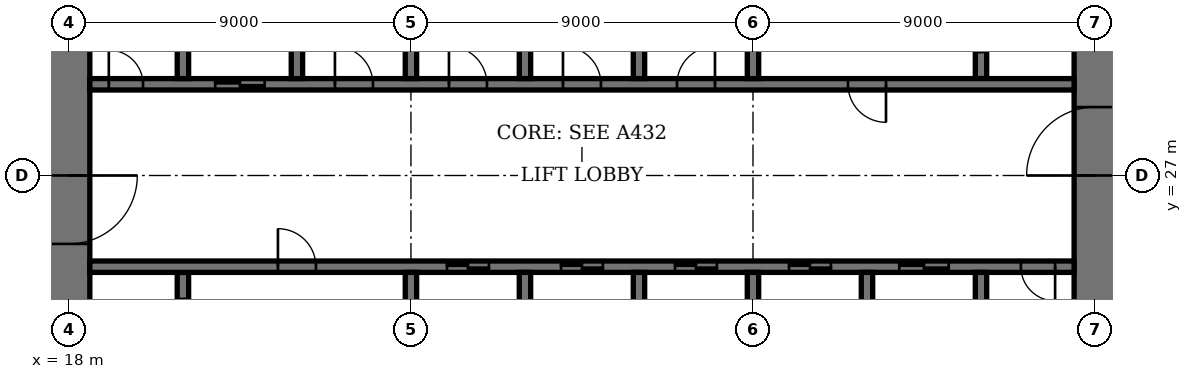
"""IFC4 building model, lengths in metres.
Left out: names, types, materials, properties, quantities, classifications, styles, units other than length and angle.
Written with IfcOpenShell. Run it as: python <this file> out.ifc"""

import sys

from ifc_helpers import new_model, si_unit, direction, frame, frame_2d, origin, place, context, subcontext, project, spatial, rectangle, extrude, element, fill, save


model = new_model("IFC4")
c1 = context("Model", 3, precision=1e-05, world=origin(), true_north=direction((0.0, 1.0)))
c2 = subcontext(c1, "Body", "Model", "MODEL_VIEW")
j1 = project(units=[si_unit("LENGTHUNIT", "METRE"), si_unit("PLANEANGLEUNIT", "RADIAN")], contexts=[c1])
p1 = place(None, origin())
s1 = spatial("IfcSite", under=j1, at=p1, CompositionType="ELEMENT")
p2 = place(p1, origin())
s2 = spatial("IfcBuilding", under=s1, at=p2, CompositionType="ELEMENT")
p3 = place(p2, frame((0.0, 0.0, 307.4)))
s3 = spatial("IfcBuildingStorey", under=s2, at=p3, CompositionType="ELEMENT", Elevation=307.4)
p4 = place(p3, frame((18.0, 35.45, 0.0), z_axis=(0.0, 0.0, 1.0), x_axis=(0.0, -1.0, 0.0)))
e1 = element("IfcWall", 1, at=p4, inside=s3, PredefinedType="SHEAR", context=c2, shape_type="SweptSolid", body=[
    extrude(rectangle(XDim=16.9, YDim=1.1, at=frame_2d((8.45, 0.0))), origin(), (0.0, 0.0, 1.0), 4.4),
])
p5 = place(p4, frame((8.45, 0.0, 0.0)))
e2 = element("IfcOpeningElement", 2, at=p5, cuts=e1, PredefinedType="OPENING", context=c2, shape_type="SweptSolid", body=[
    extrude(rectangle(XDim=1.8, YDim=2.4, at=frame_2d((0.9, 1.2))), frame((0.0, 0.56, 0.0), z_axis=(0.0, -1.0, 0.0), x_axis=(1.0, 0.0, 0.0)), (0.0, 0.0, 1.0), 1.12),
])
p6 = place(p3, frame((45.0, 18.55, 0.0), z_axis=(0.0, 0.0, 1.0), x_axis=(0.0, 1.0, 0.0)))
e3 = element("IfcWall", 3, at=p6, inside=s3, PredefinedType="SHEAR", context=c2, shape_type="SweptSolid", body=[
    extrude(rectangle(XDim=16.9, YDim=1.1, at=frame_2d((8.45, 0.0))), origin(), (0.0, 0.0, 1.0), 4.4),
])
p7 = place(p6, frame((8.45, 0.0, 0.0)))
e4 = element("IfcOpeningElement", 4, at=p7, cuts=e3, PredefinedType="OPENING", context=c2, shape_type="SweptSolid", body=[
    extrude(rectangle(XDim=1.8, YDim=2.4, at=frame_2d((0.9, 1.2))), frame((0.0, 0.56, 0.0), z_axis=(0.0, -1.0, 0.0), x_axis=(1.0, 0.0, 0.0)), (0.0, 0.0, 1.0), 1.12),
])
p8 = place(p3, frame((21.0, 21.95, 0.0), z_axis=(0.0, 0.0, 1.0), x_axis=(0.0, 1.0, 0.0)))
e5 = element("IfcWall", 5, at=p8, inside=s3, PredefinedType="SHEAR", context=c2, shape_type="SweptSolid", body=[
    extrude(rectangle(XDim=2.5, YDim=0.3, at=frame_2d((1.25, 0.0))), origin(), (0.0, 0.0, 1.0), 4.4),
])
p9 = place(p8, frame((0.7, 0.0, 0.0)))
e6 = element("IfcOpeningElement", 6, at=p9, cuts=e5, PredefinedType="OPENING", context=c2, shape_type="SweptSolid", body=[
    extrude(rectangle(XDim=1.1, YDim=2.4, at=frame_2d((0.55, 1.2))), frame((0.0, 0.16, 0.0), z_axis=(0.0, -1.0, 0.0), x_axis=(1.0, 0.0, 0.0)), (0.0, 0.0, 1.0), 0.32),
])
p10 = place(p3, frame((42.0, 29.55, 0.0), z_axis=(0.0, 0.0, 1.0), x_axis=(0.0, 1.0, 0.0)))
e7 = element("IfcWall", 7, at=p10, inside=s3, PredefinedType="SHEAR", context=c2, shape_type="SweptSolid", body=[
    extrude(rectangle(XDim=2.5, YDim=0.3, at=frame_2d((1.25, 0.0))), origin(), (0.0, 0.0, 1.0), 4.4),
])
p11 = place(p10, frame((0.7, 0.0, 0.0)))
e8 = element("IfcOpeningElement", 8, at=p11, cuts=e7, PredefinedType="OPENING", context=c2, shape_type="SweptSolid", body=[
    extrude(rectangle(XDim=1.1, YDim=2.4, at=frame_2d((0.55, 1.2))), frame((0.0, 0.16, 0.0), z_axis=(0.0, -1.0, 0.0), x_axis=(1.0, 0.0, 0.0)), (0.0, 0.0, 1.0), 0.32),
])
p12 = place(p3, frame((18.55, 24.6, 0.0), z_axis=(0.0, 0.0, 1.0), x_axis=(1.0, 0.0, 0.0)))
e9 = element("IfcWall", 9, at=p12, inside=s3, PredefinedType="SHEAR", context=c2, shape_type="SweptSolid", body=[
    extrude(rectangle(XDim=25.9, YDim=0.3, at=frame_2d((12.95, 0.0))), origin(), (0.0, 0.0, 1.0), 4.4),
])
p13 = place(p12, frame((4.95, 0.0, 0.0)))
e10 = element("IfcOpeningElement", 10, at=p13, cuts=e9, PredefinedType="OPENING", context=c2, shape_type="SweptSolid", body=[
    extrude(rectangle(XDim=1.0, YDim=2.4, at=frame_2d((0.5, 1.2))), frame((0.0, 0.16, 0.0), z_axis=(0.0, -1.0, 0.0), x_axis=(1.0, 0.0, 0.0)), (0.0, 0.0, 1.0), 0.32),
])
p14 = place(p12, frame((24.5, 0.0, 0.0)))
e11 = element("IfcOpeningElement", 11, at=p14, cuts=e9, PredefinedType="OPENING", context=c2, shape_type="SweptSolid", body=[
    extrude(rectangle(XDim=0.9, YDim=2.1, at=frame_2d((0.45, 1.05))), frame((0.0, 0.16, 0.0), z_axis=(0.0, -1.0, 0.0), x_axis=(1.0, 0.0, 0.0)), (0.0, 0.0, 1.0), 0.32),
])
p15 = place(p12, frame((9.4, 0.0, 0.0)))
e12 = element("IfcOpeningElement", 12, at=p15, cuts=e9, PredefinedType="OPENING", context=c2, shape_type="SweptSolid", body=[
    extrude(rectangle(XDim=1.1, YDim=2.4, at=frame_2d((0.55, 1.2))), frame((0.0, 0.16, 0.0), z_axis=(0.0, -1.0, 0.0), x_axis=(1.0, 0.0, 0.0)), (0.0, 0.0, 1.0), 0.32),
])
p16 = place(p12, frame((12.4, 0.0, 0.0)))
e13 = element("IfcOpeningElement", 13, at=p16, cuts=e9, PredefinedType="OPENING", context=c2, shape_type="SweptSolid", body=[
    extrude(rectangle(XDim=1.1, YDim=2.4, at=frame_2d((0.55, 1.2))), frame((0.0, 0.16, 0.0), z_axis=(0.0, -1.0, 0.0), x_axis=(1.0, 0.0, 0.0)), (0.0, 0.0, 1.0), 0.32),
])
p17 = place(p12, frame((15.4, 0.0, 0.0)))
e14 = element("IfcOpeningElement", 14, at=p17, cuts=e9, PredefinedType="OPENING", context=c2, shape_type="SweptSolid", body=[
    extrude(rectangle(XDim=1.1, YDim=2.4, at=frame_2d((0.55, 1.2))), frame((0.0, 0.16, 0.0), z_axis=(0.0, -1.0, 0.0), x_axis=(1.0, 0.0, 0.0)), (0.0, 0.0, 1.0), 0.32),
])
p18 = place(p12, frame((18.4, 0.0, 0.0)))
e15 = element("IfcOpeningElement", 15, at=p18, cuts=e9, PredefinedType="OPENING", context=c2, shape_type="SweptSolid", body=[
    extrude(rectangle(XDim=1.1, YDim=2.4, at=frame_2d((0.55, 1.2))), frame((0.0, 0.16, 0.0), z_axis=(0.0, -1.0, 0.0), x_axis=(1.0, 0.0, 0.0)), (0.0, 0.0, 1.0), 0.32),
])
p19 = place(p12, frame((21.3, 0.0, 0.0)))
e16 = element("IfcOpeningElement", 16, at=p19, cuts=e9, PredefinedType="OPENING", context=c2, shape_type="SweptSolid", body=[
    extrude(rectangle(XDim=1.3, YDim=2.4, at=frame_2d((0.65, 1.2))), frame((0.0, 0.16, 0.0), z_axis=(0.0, -1.0, 0.0), x_axis=(1.0, 0.0, 0.0)), (0.0, 0.0, 1.0), 0.32),
])
p20 = place(p3, frame((18.55, 29.4, 0.0), z_axis=(0.0, 0.0, 1.0), x_axis=(1.0, 0.0, 0.0)))
e17 = element("IfcWall", 17, at=p20, inside=s3, PredefinedType="SHEAR", context=c2, shape_type="SweptSolid", body=[
    extrude(rectangle(XDim=25.9, YDim=0.3, at=frame_2d((12.95, 0.0))), origin(), (0.0, 0.0, 1.0), 4.4),
])
p21 = place(p20, frame((19.95, 0.0, 0.0)))
e18 = element("IfcOpeningElement", 18, at=p21, cuts=e17, PredefinedType="OPENING", context=c2, shape_type="SweptSolid", body=[
    extrude(rectangle(XDim=1.0, YDim=2.4, at=frame_2d((0.5, 1.2))), frame((0.0, 0.16, 0.0), z_axis=(0.0, -1.0, 0.0), x_axis=(1.0, 0.0, 0.0)), (0.0, 0.0, 1.0), 0.32),
])
p22 = place(p20, frame((0.5, 0.0, 0.0)))
e19 = element("IfcOpeningElement", 19, at=p22, cuts=e17, PredefinedType="OPENING", context=c2, shape_type="SweptSolid", body=[
    extrude(rectangle(XDim=0.9, YDim=2.1, at=frame_2d((0.45, 1.05))), frame((0.0, 0.16, 0.0), z_axis=(0.0, -1.0, 0.0), x_axis=(1.0, 0.0, 0.0)), (0.0, 0.0, 1.0), 0.32),
])
p23 = place(p20, frame((15.45, 0.0, 0.0)))
e20 = element("IfcOpeningElement", 20, at=p23, cuts=e17, PredefinedType="OPENING", context=c2, shape_type="SweptSolid", body=[
    extrude(rectangle(XDim=1.0, YDim=2.4, at=frame_2d((0.5, 1.2))), frame((0.0, 0.16, 0.0), z_axis=(0.0, -1.0, 0.0), x_axis=(1.0, 0.0, 0.0)), (0.0, 0.0, 1.0), 0.32),
])
p24 = place(p20, frame((12.45, 0.0, 0.0)))
e21 = element("IfcOpeningElement", 21, at=p24, cuts=e17, PredefinedType="OPENING", context=c2, shape_type="SweptSolid", body=[
    extrude(rectangle(XDim=1.0, YDim=2.4, at=frame_2d((0.5, 1.2))), frame((0.0, 0.16, 0.0), z_axis=(0.0, -1.0, 0.0), x_axis=(1.0, 0.0, 0.0)), (0.0, 0.0, 1.0), 0.32),
])
p25 = place(p20, frame((9.45, 0.0, 0.0)))
e22 = element("IfcOpeningElement", 22, at=p25, cuts=e17, PredefinedType="OPENING", context=c2, shape_type="SweptSolid", body=[
    extrude(rectangle(XDim=1.0, YDim=2.4, at=frame_2d((0.5, 1.2))), frame((0.0, 0.16, 0.0), z_axis=(0.0, -1.0, 0.0), x_axis=(1.0, 0.0, 0.0)), (0.0, 0.0, 1.0), 0.32),
])
p26 = place(p20, frame((6.45, 0.0, 0.0)))
e23 = element("IfcOpeningElement", 23, at=p26, cuts=e17, PredefinedType="OPENING", context=c2, shape_type="SweptSolid", body=[
    extrude(rectangle(XDim=1.0, YDim=2.4, at=frame_2d((0.5, 1.2))), frame((0.0, 0.16, 0.0), z_axis=(0.0, -1.0, 0.0), x_axis=(1.0, 0.0, 0.0)), (0.0, 0.0, 1.0), 0.32),
])
p27 = place(p20, frame((3.3, 0.0, 0.0)))
e24 = element("IfcOpeningElement", 24, at=p27, cuts=e17, PredefinedType="OPENING", context=c2, shape_type="SweptSolid", body=[
    extrude(rectangle(XDim=1.3, YDim=2.4, at=frame_2d((0.65, 1.2))), frame((0.0, 0.16, 0.0), z_axis=(0.0, -1.0, 0.0), x_axis=(1.0, 0.0, 0.0)), (0.0, 0.0, 1.0), 0.32),
])
for number, where, z_axis, x_axis in (
    (25, (30.0, 21.75, 0.0), (0.0, 0.0, 1.0), (0.0, 1.0, 0.0)),
    (26, (33.0, 29.55, 0.0), (0.0, 0.0, 1.0), (0.0, 1.0, 0.0)),
    (27, (33.0, 21.75, 0.0), (0.0, 0.0, 1.0), (0.0, 1.0, 0.0)),
    (28, (30.0, 29.55, 0.0), (0.0, 0.0, 1.0), (0.0, 1.0, 0.0)),
    (29, (36.0, 21.75, 0.0), (0.0, 0.0, 1.0), (0.0, 1.0, 0.0)),
    (30, (27.0, 29.55, 0.0), (0.0, 0.0, 1.0), (0.0, 1.0, 0.0)),
):
    element("IfcWall", number, at=place(p3, frame(where, z_axis=z_axis, x_axis=x_axis)), inside=s3, PredefinedType="SHEAR", context=c2, shape_type="SweptSolid", body=[
        extrude(rectangle(XDim=2.7, YDim=0.3, at=frame_2d((1.35, 0.0))), origin(), (0.0, 0.0, 1.0), 4.4),
    ])
for number, where, z_axis, x_axis in (
    (31, (39.0, 18.55, 0.0), (0.0, 0.0, 1.0), (0.0, 1.0, 0.0)),
    (32, (24.0, 29.55, 0.0), (0.0, 0.0, 1.0), (0.0, 1.0, 0.0)),
):
    element("IfcWall", number, at=place(p3, frame(where, z_axis=z_axis, x_axis=x_axis)), inside=s3, PredefinedType="SHEAR", context=c2, shape_type="SweptSolid", body=[
        extrude(rectangle(XDim=5.9, YDim=0.3, at=frame_2d((2.95, 0.0))), origin(), (0.0, 0.0, 1.0), 4.4),
    ])
for number, where, z_axis, x_axis in (
    (33, (42.0, 21.75, 0.0), (0.0, 0.0, 1.0), (0.0, 1.0, 0.0)),
    (34, (21.0, 29.55, 0.0), (0.0, 0.0, 1.0), (0.0, 1.0, 0.0)),
):
    element("IfcWall", number, at=place(p3, frame(where, z_axis=z_axis, x_axis=x_axis)), inside=s3, PredefinedType="SHEAR", context=c2, shape_type="SweptSolid", body=[
        extrude(rectangle(XDim=2.7, YDim=0.3, at=frame_2d((1.35, 0.0))), origin(), (0.0, 0.0, 1.0), 4.4),
    ])
for number, where, z_axis, x_axis in (
    (35, (27.0, 21.6, 0.0), (0.0, 0.0, 1.0), (0.0, 1.0, 0.0)),
    (36, (36.0, 29.55, 0.0), (0.0, 0.0, 1.0), (0.0, 1.0, 0.0)),
):
    element("IfcWall", number, at=place(p3, frame(where, z_axis=z_axis, x_axis=x_axis)), inside=s3, PredefinedType="SHEAR", context=c2, shape_type="SweptSolid", body=[
        extrude(rectangle(XDim=2.85, YDim=0.3, at=frame_2d((1.425, 0.0))), origin(), (0.0, 0.0, 1.0), 4.4),
    ])
p28 = place(p5, origin())
e37 = element("IfcDoor", 37, at=p28, inside=s3, OperationType="DOUBLE_DOOR_DOUBLE_SWING", PredefinedType="DOOR", context=c2, shape_type="SweptSolid", body=[
    extrude(rectangle(XDim=1.8, YDim=2.4, at=frame_2d((0.9, 1.2))), frame((0.0, 0.03, 0.0), z_axis=(0.0, -1.0, 0.0), x_axis=(1.0, 0.0, 0.0)), (0.0, 0.0, 1.0), 0.06),
    extrude(rectangle(XDim=0.04, YDim=2.4, at=frame_2d((0.02, 1.2))), frame((0.0, 0.55, 0.0), z_axis=(0.0, -1.0, 0.0), x_axis=(1.0, 0.0, 0.0)), (0.0, 0.0, 1.0), 1.1),
    extrude(rectangle(XDim=0.04, YDim=2.4, at=frame_2d((1.78, 1.2))), frame((0.0, 0.55, 0.0), z_axis=(0.0, -1.0, 0.0), x_axis=(1.0, 0.0, 0.0)), (0.0, 0.0, 1.0), 1.1),
    extrude(rectangle(XDim=1.8, YDim=0.04, at=frame_2d((0.9, 2.38))), frame((0.0, 0.55, 0.0), z_axis=(0.0, -1.0, 0.0), x_axis=(1.0, 0.0, 0.0)), (0.0, 0.0, 1.0), 1.1),
])
fill(e2, e37)
p29 = place(p7, origin())
e38 = element("IfcDoor", 38, at=p29, inside=s3, OperationType="DOUBLE_DOOR_DOUBLE_SWING", PredefinedType="DOOR", context=c2, shape_type="SweptSolid", body=[
    extrude(rectangle(XDim=1.8, YDim=2.4, at=frame_2d((0.9, 1.2))), frame((0.0, 0.03, 0.0), z_axis=(0.0, -1.0, 0.0), x_axis=(1.0, 0.0, 0.0)), (0.0, 0.0, 1.0), 0.06),
    extrude(rectangle(XDim=0.04, YDim=2.4, at=frame_2d((0.02, 1.2))), frame((0.0, 0.55, 0.0), z_axis=(0.0, -1.0, 0.0), x_axis=(1.0, 0.0, 0.0)), (0.0, 0.0, 1.0), 1.1),
    extrude(rectangle(XDim=0.04, YDim=2.4, at=frame_2d((1.78, 1.2))), frame((0.0, 0.55, 0.0), z_axis=(0.0, -1.0, 0.0), x_axis=(1.0, 0.0, 0.0)), (0.0, 0.0, 1.0), 1.1),
    extrude(rectangle(XDim=1.8, YDim=0.04, at=frame_2d((0.9, 2.38))), frame((0.0, 0.55, 0.0), z_axis=(0.0, -1.0, 0.0), x_axis=(1.0, 0.0, 0.0)), (0.0, 0.0, 1.0), 1.1),
])
fill(e4, e38)
p30 = place(p13, origin())
e39 = element("IfcDoor", 39, at=p30, inside=s3, OperationType="SINGLE_SWING_RIGHT", PredefinedType="DOOR", context=c2, shape_type="SweptSolid", body=[
    extrude(rectangle(XDim=1.0, YDim=2.4, at=frame_2d((0.5, 1.2))), frame((0.0, 0.03, 0.0), z_axis=(0.0, -1.0, 0.0), x_axis=(1.0, 0.0, 0.0)), (0.0, 0.0, 1.0), 0.06),
])
fill(e10, e39)
p31 = place(p21, origin())
e40 = element("IfcDoor", 40, at=p31, inside=s3, OperationType="SINGLE_SWING_RIGHT", PredefinedType="DOOR", context=c2, shape_type="SweptSolid", body=[
    extrude(rectangle(XDim=1.0, YDim=2.4, at=frame_2d((0.5, 1.2))), frame((0.0, 0.03, 0.0), z_axis=(0.0, -1.0, 0.0), x_axis=(1.0, 0.0, 0.0)), (0.0, 0.0, 1.0), 0.06),
])
fill(e18, e40)
p32 = place(p14, origin())
e41 = element("IfcDoor", 41, at=p32, inside=s3, OperationType="SINGLE_SWING_RIGHT", PredefinedType="DOOR", context=c2, shape_type="SweptSolid", body=[
    extrude(rectangle(XDim=0.9, YDim=2.1, at=frame_2d((0.45, 1.05))), frame((0.0, 0.03, 0.0), z_axis=(0.0, -1.0, 0.0), x_axis=(1.0, 0.0, 0.0)), (0.0, 0.0, 1.0), 0.06),
])
fill(e11, e41)
p33 = place(p22, origin())
e42 = element("IfcDoor", 42, at=p33, inside=s3, OperationType="SINGLE_SWING_RIGHT", PredefinedType="DOOR", context=c2, shape_type="SweptSolid", body=[
    extrude(rectangle(XDim=0.9, YDim=2.1, at=frame_2d((0.45, 1.05))), frame((0.0, 0.03, 0.0), z_axis=(0.0, -1.0, 0.0), x_axis=(1.0, 0.0, 0.0)), (0.0, 0.0, 1.0), 0.06),
])
fill(e19, e42)
p34 = place(p15, origin())
e43 = element("IfcDoor", 43, at=p34, inside=s3, OperationType="DOUBLE_DOOR_SLIDING", PredefinedType="DOOR", context=c2, shape_type="SweptSolid", body=[
    extrude(rectangle(XDim=1.1, YDim=2.4, at=frame_2d((0.55, 1.2))), frame((0.0, 0.02, 0.0), z_axis=(0.0, -1.0, 0.0), x_axis=(1.0, 0.0, 0.0)), (0.0, 0.0, 1.0), 0.04),
])
fill(e12, e43)
p35 = place(p16, origin())
e44 = element("IfcDoor", 44, at=p35, inside=s3, OperationType="DOUBLE_DOOR_SLIDING", PredefinedType="DOOR", context=c2, shape_type="SweptSolid", body=[
    extrude(rectangle(XDim=1.1, YDim=2.4, at=frame_2d((0.55, 1.2))), frame((0.0, 0.02, 0.0), z_axis=(0.0, -1.0, 0.0), x_axis=(1.0, 0.0, 0.0)), (0.0, 0.0, 1.0), 0.04),
])
fill(e13, e44)
p36 = place(p17, origin())
e45 = element("IfcDoor", 45, at=p36, inside=s3, OperationType="DOUBLE_DOOR_SLIDING", PredefinedType="DOOR", context=c2, shape_type="SweptSolid", body=[
    extrude(rectangle(XDim=1.1, YDim=2.4, at=frame_2d((0.55, 1.2))), frame((0.0, 0.02, 0.0), z_axis=(0.0, -1.0, 0.0), x_axis=(1.0, 0.0, 0.0)), (0.0, 0.0, 1.0), 0.04),
])
fill(e14, e45)
p37 = place(p18, origin())
e46 = element("IfcDoor", 46, at=p37, inside=s3, OperationType="DOUBLE_DOOR_SLIDING", PredefinedType="DOOR", context=c2, shape_type="SweptSolid", body=[
    extrude(rectangle(XDim=1.1, YDim=2.4, at=frame_2d((0.55, 1.2))), frame((0.0, 0.02, 0.0), z_axis=(0.0, -1.0, 0.0), x_axis=(1.0, 0.0, 0.0)), (0.0, 0.0, 1.0), 0.04),
])
fill(e15, e46)
p38 = place(p23, origin())
e47 = element("IfcDoor", 47, at=p38, inside=s3, OperationType="SINGLE_SWING_LEFT", PredefinedType="DOOR", context=c2, shape_type="SweptSolid", body=[
    extrude(rectangle(XDim=1.0, YDim=2.4, at=frame_2d((0.5, 1.2))), frame((0.0, 0.03, 0.0), z_axis=(0.0, -1.0, 0.0), x_axis=(1.0, 0.0, 0.0)), (0.0, 0.0, 1.0), 0.06),
])
fill(e20, e47)
p39 = place(p24, origin())
e48 = element("IfcDoor", 48, at=p39, inside=s3, OperationType="SINGLE_SWING_RIGHT", PredefinedType="DOOR", context=c2, shape_type="SweptSolid", body=[
    extrude(rectangle(XDim=1.0, YDim=2.4, at=frame_2d((0.5, 1.2))), frame((0.0, 0.03, 0.0), z_axis=(0.0, -1.0, 0.0), x_axis=(1.0, 0.0, 0.0)), (0.0, 0.0, 1.0), 0.06),
])
fill(e21, e48)
p40 = place(p25, origin())
e49 = element("IfcDoor", 49, at=p40, inside=s3, OperationType="SINGLE_SWING_RIGHT", PredefinedType="DOOR", context=c2, shape_type="SweptSolid", body=[
    extrude(rectangle(XDim=1.0, YDim=2.4, at=frame_2d((0.5, 1.2))), frame((0.0, 0.03, 0.0), z_axis=(0.0, -1.0, 0.0), x_axis=(1.0, 0.0, 0.0)), (0.0, 0.0, 1.0), 0.06),
])
fill(e22, e49)
p41 = place(p26, origin())
e50 = element("IfcDoor", 50, at=p41, inside=s3, OperationType="SINGLE_SWING_RIGHT", PredefinedType="DOOR", context=c2, shape_type="SweptSolid", body=[
    extrude(rectangle(XDim=1.0, YDim=2.4, at=frame_2d((0.5, 1.2))), frame((0.0, 0.03, 0.0), z_axis=(0.0, -1.0, 0.0), x_axis=(1.0, 0.0, 0.0)), (0.0, 0.0, 1.0), 0.06),
])
fill(e23, e50)
p42 = place(p19, origin())
e51 = element("IfcDoor", 51, at=p42, inside=s3, OperationType="DOUBLE_DOOR_SLIDING", PredefinedType="DOOR", context=c2, shape_type="SweptSolid", body=[
    extrude(rectangle(XDim=1.3, YDim=2.4, at=frame_2d((0.65, 1.2))), frame((0.0, 0.02, 0.0), z_axis=(0.0, -1.0, 0.0), x_axis=(1.0, 0.0, 0.0)), (0.0, 0.0, 1.0), 0.04),
])
fill(e16, e51)
p43 = place(p27, origin())
e52 = element("IfcDoor", 52, at=p43, inside=s3, OperationType="DOUBLE_DOOR_SLIDING", PredefinedType="DOOR", context=c2, shape_type="SweptSolid", body=[
    extrude(rectangle(XDim=1.3, YDim=2.4, at=frame_2d((0.65, 1.2))), frame((0.0, 0.02, 0.0), z_axis=(0.0, -1.0, 0.0), x_axis=(1.0, 0.0, 0.0)), (0.0, 0.0, 1.0), 0.04),
])
fill(e24, e52)
save(model, sys.argv[1])
